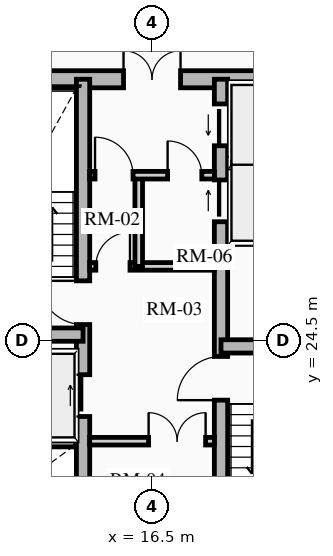
"""IFC4 building model, lengths in metres.
Left out: names, types, materials, properties, quantities, classifications, styles, units other than length and angle.
Written with IfcOpenShell. Run it as: python <this file> out.ifc"""

import sys

from ifc_helpers import new_model, si_unit, direction, frame, frame_2d, origin, place, context, subcontext, project, spatial, rectangle, extrude, source, transform, mapped, element, fill, save


model = new_model("IFC4")
c1 = context("Model", 3, precision=1e-05, world=origin(), true_north=direction((0.0, 1.0)))
c2 = subcontext(c1, "Body", "Model", "MODEL_VIEW")
j1 = project(units=[si_unit("LENGTHUNIT", "METRE"), si_unit("PLANEANGLEUNIT", "RADIAN")], contexts=[c1])
p1 = place(None, origin())
s1 = spatial("IfcSite", under=j1, at=p1, CompositionType="ELEMENT")
p2 = place(p1, origin())
s2 = spatial("IfcBuilding", under=s1, at=p2, CompositionType="ELEMENT")
p3 = place(p2, frame((0.0, 0.0, 116.71)))
s3 = spatial("IfcBuildingStorey", under=s2, at=p3, CompositionType="ELEMENT", Elevation=116.71)
p4 = place(p3, frame((11.15, 31.375, 0.0), z_axis=(0.0, 0.0, 1.0), x_axis=(1.0, 0.0, 0.0)))
e1 = element("IfcWall", 1, at=p4, inside=s3, PredefinedType="SHEAR", context=c2, shape_type="SweptSolid", body=[
    extrude(rectangle(XDim=10.7, YDim=0.45, at=frame_2d((5.35, 0.0))), origin(), (0.0, 0.0, 1.0), 2.91),
])
m1 = source(origin(), c2, "Body", "SweptSolid", [
    extrude(rectangle(XDim=1.5, YDim=2.02, at=frame_2d((0.75, 1.01))), frame((0.0, 0.235, 0.0), z_axis=(0.0, -1.0, 0.0), x_axis=(1.0, 0.0, 0.0)), (0.0, 0.0, 1.0), 0.47),
])
p5 = place(p4, frame((4.6, 0.0, 0.0)))
e2 = element("IfcOpeningElement", 2, at=p5, cuts=e1, PredefinedType="OPENING", context=c2, shape_type="MappedRepresentation", body=[
    mapped(m1, transform((0.0, 0.0, 0.0), x_axis=(1.0, 0.0, 0.0), y_axis=(0.0, 1.0, 0.0), z_axis=(0.0, 0.0, 1.0), scale=1.0)),
])
p6 = place(p3, frame((14.685, 17.625, 0.0), z_axis=(0.0, 0.0, 1.0), x_axis=(0.0, 1.0, 0.0)))
e3 = element("IfcWall", 3, at=p6, inside=s3, PredefinedType="SHEAR", context=c2, shape_type="SweptSolid", body=[
    extrude(rectangle(XDim=13.75, YDim=0.35, at=frame_2d((6.875, 0.0))), origin(), (0.0, 0.0, 1.0), 2.91),
])
m2 = source(origin(), c2, "Body", "SweptSolid", [
    extrude(rectangle(XDim=1.1, YDim=2.015, at=frame_2d((0.55, 1.007))), frame((0.0, 0.185, 0.0), z_axis=(0.0, -1.0, 0.0), x_axis=(1.0, 0.0, 0.0)), (0.0, 0.0, 1.0), 0.37),
])
p7 = place(p6, frame((4.875, 0.0, 0.0)))
e4 = element("IfcOpeningElement", 4, at=p7, cuts=e3, PredefinedType="OPENING", context=c2, shape_type="MappedRepresentation", body=[
    mapped(m2, transform((0.0, 0.0, 0.0), x_axis=(1.0, 0.0, 0.0), y_axis=(0.0, 1.0, 0.0), z_axis=(0.0, 0.0, 1.0), scale=1.0)),
])
m3 = source(origin(), c2, "Body", "SweptSolid", [
    extrude(rectangle(XDim=1.15, YDim=2.02, at=frame_2d((0.575, 1.01))), frame((0.0, 0.185, 0.0), z_axis=(0.0, -1.0, 0.0), x_axis=(1.0, 0.0, 0.0)), (0.0, 0.0, 1.0), 0.37),
])
p8 = place(p6, frame((7.295, 0.0, 0.0)))
e5 = element("IfcOpeningElement", 5, at=p8, cuts=e3, PredefinedType="OPENING", context=c2, shape_type="MappedRepresentation", body=[
    mapped(m3, transform((0.0, 0.0, 0.0), x_axis=(1.0, 0.0, 0.0), y_axis=(0.0, 1.0, 0.0), z_axis=(0.0, 0.0, 1.0), scale=1.0)),
])
p9 = place(p3, frame((18.315, 17.625, 0.0), z_axis=(0.0, 0.0, 1.0), x_axis=(0.0, 1.0, 0.0)))
e6 = element("IfcWall", 6, at=p9, inside=s3, PredefinedType="SHEAR", context=c2, shape_type="SweptSolid", body=[
    extrude(rectangle(XDim=13.75, YDim=0.35, at=frame_2d((6.875, 0.0))), origin(), (0.0, 0.0, 1.0), 2.91),
])
p10 = place(p9, frame((10.0, 0.0, 0.0)))
e7 = element("IfcOpeningElement", 7, at=p10, cuts=e6, PredefinedType="OPENING", context=c2, shape_type="MappedRepresentation", body=[
    mapped(m2, transform((0.0, 0.0, 0.0), x_axis=(1.0, 0.0, 0.0), y_axis=(0.0, 1.0, 0.0), z_axis=(0.0, 0.0, 1.0), scale=1.0)),
])
p11 = place(p9, frame((12.0, 0.0, 0.0)))
e8 = element("IfcOpeningElement", 8, at=p11, cuts=e6, PredefinedType="OPENING", context=c2, shape_type="MappedRepresentation", body=[
    mapped(m2, transform((0.0, 0.0, 0.0), x_axis=(1.0, 0.0, 0.0), y_axis=(0.0, 1.0, 0.0), z_axis=(0.0, 0.0, 1.0), scale=1.0)),
])
p12 = place(p9, frame((5.305, 0.0, 0.0)))
e9 = element("IfcOpeningElement", 9, at=p12, cuts=e6, PredefinedType="OPENING", context=c2, shape_type="MappedRepresentation", body=[
    mapped(m3, transform((0.0, 0.0, 0.0), x_axis=(1.0, 0.0, 0.0), y_axis=(0.0, 1.0, 0.0), z_axis=(0.0, 0.0, 1.0), scale=1.0)),
])
for number, where, z_axis, x_axis in (
    (10, (11.4, 24.655, 0.0), (0.0, 0.0, 1.0), (1.0, 0.0, 0.0)),
    (11, (18.315, 24.345, 0.0), (0.0, 0.0, 1.0), (1.0, 0.0, 0.0)),
):
    element("IfcWall", number, at=place(p3, frame(where, z_axis=z_axis, x_axis=x_axis)), inside=s3, PredefinedType="SHEAR", context=c2, shape_type="SweptSolid", body=[
        extrude(rectangle(XDim=3.285, YDim=0.35, at=frame_2d((1.643, 0.0))), origin(), (0.0, 0.0, 1.0), 2.91),
    ])
for number, where, z_axis, x_axis in (
    (12, (11.52, 21.8, 0.0), (0.0, 0.0, 1.0), (1.0, 0.0, 0.0)),
    (13, (18.51, 27.13, 0.0), (0.0, 0.0, 1.0), (1.0, 0.0, 0.0)),
    (14, (18.51, 29.175, 0.0), (0.0, 0.0, 1.0), (1.0, 0.0, 0.0)),
):
    element("IfcWall", number, at=place(p3, frame(where, z_axis=z_axis, x_axis=x_axis)), inside=s3, PredefinedType="SHEAR", context=c2, shape_type="SweptSolid", body=[
        extrude(rectangle(XDim=2.97, YDim=0.2, at=frame_2d((1.485, 0.0))), origin(), (0.0, 0.0, 1.0), 2.91),
    ])
p13 = place(p3, frame((14.86, 21.85, 0.0), z_axis=(0.0, 0.0, 1.0), x_axis=(1.0, 0.0, 0.0)))
e15 = element("IfcWall", 15, at=p13, inside=s3, PredefinedType="PARTITIONING", context=c2, shape_type="SweptSolid", body=[
    extrude(rectangle(XDim=3.28, YDim=0.2, at=frame_2d((1.64, 0.0))), origin(), (0.0, 0.0, 1.0), 2.655),
])
m4 = source(origin(), c2, "Body", "SweptSolid", [
    extrude(rectangle(XDim=1.5, YDim=2.02, at=frame_2d((0.75, 1.01))), frame((0.0, 0.11, 0.0), z_axis=(0.0, -1.0, 0.0), x_axis=(1.0, 0.0, 0.0)), (0.0, 0.0, 1.0), 0.22),
])
p14 = place(p13, frame((1.55, 0.0, 0.0)))
e16 = element("IfcOpeningElement", 16, at=p14, cuts=e15, PredefinedType="OPENING", context=c2, shape_type="MappedRepresentation", body=[
    mapped(m4, transform((0.0, 0.0, 0.0), x_axis=(1.0, 0.0, 0.0), y_axis=(0.0, 1.0, 0.0), z_axis=(0.0, 0.0, 1.0), scale=1.0)),
])
p15 = place(p3, frame((14.86, 26.45, 0.0), z_axis=(0.0, 0.0, 1.0), x_axis=(1.0, 0.0, 0.0)))
e17 = element("IfcWall", 17, at=p15, inside=s3, PredefinedType="PARTITIONING", context=c2, shape_type="SweptSolid", body=[
    extrude(rectangle(XDim=3.28, YDim=0.2, at=frame_2d((1.64, 0.0))), origin(), (0.0, 0.0, 1.0), 2.655),
])
m5 = source(origin(), c2, "Body", "SweptSolid", [
    extrude(rectangle(XDim=0.9, YDim=2.005, at=frame_2d((0.45, 1.002))), frame((0.0, 0.11, 0.0), z_axis=(0.0, -1.0, 0.0), x_axis=(1.0, 0.0, 0.0)), (0.0, 0.0, 1.0), 0.22),
])
p16 = place(p15, frame((0.16, 0.0, 0.0)))
e18 = element("IfcOpeningElement", 18, at=p16, cuts=e17, PredefinedType="OPENING", context=c2, shape_type="MappedRepresentation", body=[
    mapped(m5, transform((0.0, 0.0, 0.0), x_axis=(1.0, 0.0, 0.0), y_axis=(0.0, 1.0, 0.0), z_axis=(0.0, 0.0, 1.0), scale=1.0)),
])
p17 = place(p3, frame((16.15, 26.45, 0.0), z_axis=(0.0, 0.0, 1.0), x_axis=(0.0, 1.0, 0.0)))
e19 = element("IfcWall", 19, at=p17, inside=s3, PredefinedType="PARTITIONING", context=c2, shape_type="SweptSolid", body=[
    extrude(rectangle(XDim=2.4, YDim=0.2, at=frame_2d((1.2, 0.0))), origin(), (0.0, 0.0, 1.0), 2.655),
])
p18 = place(p3, frame((14.86, 28.85, 0.0), z_axis=(0.0, 0.0, 1.0), x_axis=(1.0, 0.0, 0.0)))
e20 = element("IfcWall", 20, at=p18, inside=s3, PredefinedType="PARTITIONING", context=c2, shape_type="SweptSolid", body=[
    extrude(rectangle(XDim=3.28, YDim=0.2, at=frame_2d((1.64, 0.0))), origin(), (0.0, 0.0, 1.0), 2.655),
])
m6 = source(origin(), c2, "Body", "SweptSolid", [
    extrude(rectangle(XDim=1.0, YDim=2.015, at=frame_2d((0.5, 1.007))), frame((0.0, 0.11, 0.0), z_axis=(0.0, -1.0, 0.0), x_axis=(1.0, 0.0, 0.0)), (0.0, 0.0, 1.0), 0.22),
])
p19 = place(p18, frame((0.14, 0.0, 0.0)))
e21 = element("IfcOpeningElement", 21, at=p19, cuts=e20, PredefinedType="OPENING", context=c2, shape_type="MappedRepresentation", body=[
    mapped(m6, transform((0.0, 0.0, 0.0), x_axis=(1.0, 0.0, 0.0), y_axis=(0.0, 1.0, 0.0), z_axis=(0.0, 0.0, 1.0), scale=1.0)),
])
p20 = place(p18, frame((2.05, 0.0, 0.0)))
e22 = element("IfcOpeningElement", 22, at=p20, cuts=e20, PredefinedType="OPENING", context=c2, shape_type="MappedRepresentation", body=[
    mapped(m5, transform((0.0, 0.0, 0.0), x_axis=(1.0, 0.0, 0.0), y_axis=(0.0, 1.0, 0.0), z_axis=(0.0, 0.0, 1.0), scale=1.0)),
])
m7 = source(origin(), c2, "Body", "SweptSolid", [
    extrude(rectangle(XDim=1.1, YDim=2.015, at=frame_2d((0.55, 1.007))), frame((0.0, 0.025, 0.0), z_axis=(0.0, -1.0, 0.0), x_axis=(1.0, 0.0, 0.0)), (0.0, 0.0, 1.0), 0.05),
])
p21 = place(p7, origin())
e23 = element("IfcDoor", 23, at=p21, inside=s3, OperationType="SLIDING_TO_RIGHT", PredefinedType="DOOR", context=c2, shape_type="MappedRepresentation", body=[
    mapped(m7, transform((0.0, 0.0, 0.0), x_axis=(1.0, 0.0, 0.0), y_axis=(0.0, 1.0, 0.0), z_axis=(0.0, 0.0, 1.0), scale=1.0)),
])
fill(e4, e23)
p22 = place(p10, origin())
e24 = element("IfcDoor", 24, at=p22, inside=s3, OperationType="SLIDING_TO_RIGHT", PredefinedType="DOOR", context=c2, shape_type="MappedRepresentation", body=[
    mapped(m7, transform((0.0, 0.0, 0.0), x_axis=(1.0, 0.0, 0.0), y_axis=(0.0, 1.0, 0.0), z_axis=(0.0, 0.0, 1.0), scale=1.0)),
])
fill(e7, e24)
p23 = place(p11, origin())
e25 = element("IfcDoor", 25, at=p23, inside=s3, OperationType="SLIDING_TO_LEFT", PredefinedType="DOOR", context=c2, shape_type="MappedRepresentation", body=[
    mapped(m7, transform((0.0, 0.0, 0.0), x_axis=(1.0, 0.0, 0.0), y_axis=(0.0, 1.0, 0.0), z_axis=(0.0, 0.0, 1.0), scale=1.0)),
])
fill(e8, e25)
m8 = source(origin(), c2, "Body", "SweptSolid", [
    extrude(rectangle(XDim=1.15, YDim=2.02, at=frame_2d((0.575, 1.01))), frame((0.0, 0.025, 0.0), z_axis=(0.0, -1.0, 0.0), x_axis=(1.0, 0.0, 0.0)), (0.0, 0.0, 1.0), 0.05),
])
p24 = place(p8, origin())
e26 = element("IfcDoor", 26, at=p24, inside=s3, OperationType="SINGLE_SWING_RIGHT", PredefinedType="DOOR", context=c2, shape_type="MappedRepresentation", body=[
    mapped(m8, transform((0.0, 0.0, 0.0), x_axis=(1.0, 0.0, 0.0), y_axis=(0.0, 1.0, 0.0), z_axis=(0.0, 0.0, 1.0), scale=1.0)),
])
fill(e5, e26)
p25 = place(p12, origin())
e27 = element("IfcDoor", 27, at=p25, inside=s3, OperationType="SINGLE_SWING_LEFT", PredefinedType="DOOR", context=c2, shape_type="MappedRepresentation", body=[
    mapped(m8, transform((0.0, 0.0, 0.0), x_axis=(1.0, 0.0, 0.0), y_axis=(0.0, 1.0, 0.0), z_axis=(0.0, 0.0, 1.0), scale=1.0)),
])
fill(e9, e27)
m9 = source(origin(), c2, "Body", "SweptSolid", [
    extrude(rectangle(XDim=1.5, YDim=2.02, at=frame_2d((0.75, 1.01))), frame((0.0, 0.025, 0.0), z_axis=(0.0, -1.0, 0.0), x_axis=(1.0, 0.0, 0.0)), (0.0, 0.0, 1.0), 0.05),
])
p26 = place(p5, origin())
e28 = element("IfcDoor", 28, at=p26, inside=s3, OperationType="DOUBLE_DOOR_SINGLE_SWING", PredefinedType="DOOR", context=c2, shape_type="MappedRepresentation", body=[
    mapped(m9, transform((0.0, 0.0, 0.0), x_axis=(1.0, 0.0, 0.0), y_axis=(0.0, 1.0, 0.0), z_axis=(0.0, 0.0, 1.0), scale=1.0)),
])
fill(e2, e28)
p27 = place(p14, origin())
e29 = element("IfcDoor", 29, at=p27, inside=s3, OperationType="DOUBLE_DOOR_SINGLE_SWING", PredefinedType="DOOR", context=c2, shape_type="MappedRepresentation", body=[
    mapped(m9, transform((0.0, 0.0, 0.0), x_axis=(1.0, 0.0, 0.0), y_axis=(0.0, 1.0, 0.0), z_axis=(0.0, 0.0, 1.0), scale=1.0)),
])
fill(e16, e29)
m10 = source(origin(), c2, "Body", "SweptSolid", [
    extrude(rectangle(XDim=0.9, YDim=2.005, at=frame_2d((0.45, 1.002))), frame((0.0, 0.025, 0.0), z_axis=(0.0, -1.0, 0.0), x_axis=(1.0, 0.0, 0.0)), (0.0, 0.0, 1.0), 0.05),
])
p28 = place(p16, origin())
e30 = element("IfcDoor", 30, at=p28, inside=s3, OperationType="SINGLE_SWING_RIGHT", PredefinedType="DOOR", context=c2, shape_type="MappedRepresentation", body=[
    mapped(m10, transform((0.0, 0.0, 0.0), x_axis=(1.0, 0.0, 0.0), y_axis=(0.0, 1.0, 0.0), z_axis=(0.0, 0.0, 1.0), scale=1.0)),
])
fill(e18, e30)
m11 = source(origin(), c2, "Body", "SweptSolid", [
    extrude(rectangle(XDim=1.0, YDim=2.015, at=frame_2d((0.5, 1.007))), frame((0.0, 0.025, 0.0), z_axis=(0.0, -1.0, 0.0), x_axis=(1.0, 0.0, 0.0)), (0.0, 0.0, 1.0), 0.05),
])
p29 = place(p19, origin())
e31 = element("IfcDoor", 31, at=p29, inside=s3, OperationType="SINGLE_SWING_LEFT", PredefinedType="DOOR", context=c2, shape_type="MappedRepresentation", body=[
    mapped(m11, transform((0.0, 0.0, 0.0), x_axis=(1.0, 0.0, 0.0), y_axis=(0.0, 1.0, 0.0), z_axis=(0.0, 0.0, 1.0), scale=1.0)),
])
fill(e21, e31)
p30 = place(p20, origin())
e32 = element("IfcDoor", 32, at=p30, inside=s3, OperationType="SINGLE_SWING_LEFT", PredefinedType="DOOR", context=c2, shape_type="MappedRepresentation", body=[
    mapped(m10, transform((0.0, 0.0, 0.0), x_axis=(1.0, 0.0, 0.0), y_axis=(0.0, 1.0, 0.0), z_axis=(0.0, 0.0, 1.0), scale=1.0)),
])
fill(e22, e32)
save(model, sys.argv[1])
